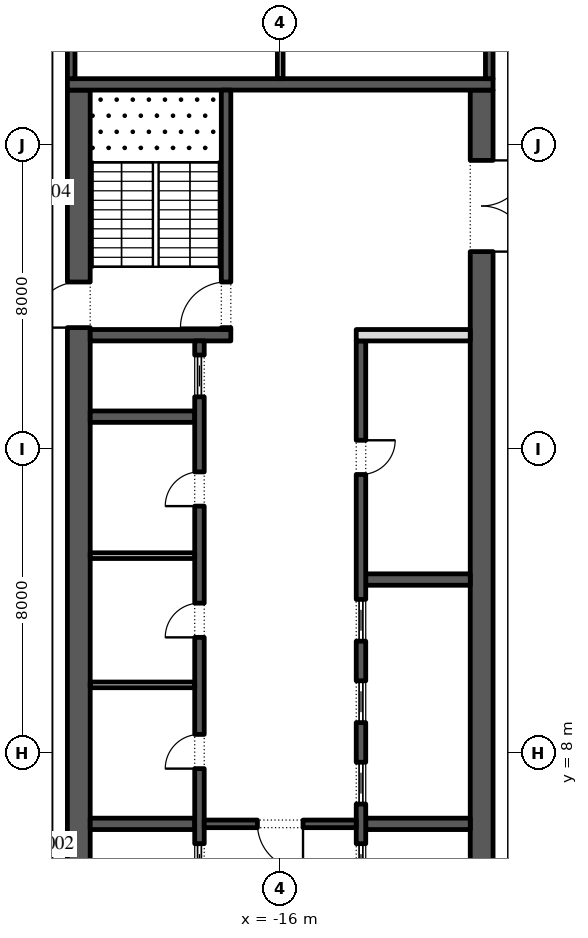
"""IFC4 building model, lengths in metres.
Left out: names, types, materials, properties, quantities, classifications, styles, units other than length and angle.
Written with IfcOpenShell. Run it as: python <this file> out.ifc"""

import sys

from ifc_helpers import new_model, si_unit, direction, frame, frame_2d, origin, place, context, subcontext, project, spatial, rectangle, extrude, element, fill, save


model = new_model("IFC4")
c1 = context("Model", 3, precision=1e-05, world=origin(), true_north=direction((0.0, 1.0)))
c2 = subcontext(c1, "Body", "Model", "MODEL_VIEW")
j1 = project(units=[si_unit("LENGTHUNIT", "METRE"), si_unit("PLANEANGLEUNIT", "RADIAN")], contexts=[c1])
p1 = place(None, origin())
s1 = spatial("IfcSite", under=j1, at=p1, CompositionType="ELEMENT")
p2 = place(p1, origin())
s2 = spatial("IfcBuilding", under=s1, at=p2, CompositionType="ELEMENT")
p3 = place(p2, frame((0.0, 0.0, 251.4)))
s3 = spatial("IfcBuildingStorey", under=s2, at=p3, CompositionType="ELEMENT", Elevation=251.4)
p4 = place(p3, frame((-21.359, 48.678, 0.0), z_axis=(0.0, 0.0, 1.0), x_axis=(-0.224949198343, -0.974370493275, 0.0)))
e1 = element("IfcWall", 1, at=p4, inside=s3, PredefinedType="STANDARD", context=c2, shape_type="SweptSolid", body=[
    extrude(rectangle(XDim=49.5, YDim=0.3, at=frame_2d((24.75, 0.0))), origin(), (0.0, 0.0, 1.0), 4.0),
])
p5 = place(p4, frame((1.157, 0.0, 0.45)))
e2 = element("IfcOpeningElement", 2, at=p5, cuts=e1, PredefinedType="OPENING", context=c2, shape_type="SweptSolid", body=[
    extrude(rectangle(XDim=4.5, YDim=3.05, at=frame_2d((2.25, 1.525))), frame((0.0, 0.16, 0.0), z_axis=(0.0, -1.0, 0.0), x_axis=(1.0, 0.0, 0.0)), (0.0, 0.0, 1.0), 0.32),
])
p6 = place(p4, frame((9.171, 0.0, 0.0)))
e3 = element("IfcOpeningElement", 3, at=p6, cuts=e1, PredefinedType="OPENING", context=c2, shape_type="SweptSolid", body=[
    extrude(rectangle(XDim=2.4, YDim=3.5, at=frame_2d((1.2, 1.75))), frame((0.0, 0.16, 0.0), z_axis=(0.0, -1.0, 0.0), x_axis=(1.0, 0.0, 0.0)), (0.0, 0.0, 1.0), 0.32),
])
p7 = place(p4, frame((15.236, 0.0, 0.45)))
e4 = element("IfcOpeningElement", 4, at=p7, cuts=e1, PredefinedType="OPENING", context=c2, shape_type="SweptSolid", body=[
    extrude(rectangle(XDim=4.5, YDim=3.05, at=frame_2d((2.25, 1.525))), frame((0.0, 0.16, 0.0), z_axis=(0.0, -1.0, 0.0), x_axis=(1.0, 0.0, 0.0)), (0.0, 0.0, 1.0), 0.32),
])
p8 = place(p4, frame((22.35, 0.0, 0.45)))
e5 = element("IfcOpeningElement", 5, at=p8, cuts=e1, PredefinedType="OPENING", context=c2, shape_type="SweptSolid", body=[
    extrude(rectangle(XDim=4.5, YDim=3.05, at=frame_2d((2.25, 1.525))), frame((0.0, 0.16, 0.0), z_axis=(0.0, -1.0, 0.0), x_axis=(1.0, 0.0, 0.0)), (0.0, 0.0, 1.0), 0.32),
])
p9 = place(p4, frame((29.464, 0.0, 0.45)))
e6 = element("IfcOpeningElement", 6, at=p9, cuts=e1, PredefinedType="OPENING", context=c2, shape_type="SweptSolid", body=[
    extrude(rectangle(XDim=4.5, YDim=3.05, at=frame_2d((2.25, 1.525))), frame((0.0, 0.16, 0.0), z_axis=(0.0, -1.0, 0.0), x_axis=(1.0, 0.0, 0.0)), (0.0, 0.0, 1.0), 0.32),
])
p10 = place(p4, frame((37.628, 0.0, 0.0)))
e7 = element("IfcOpeningElement", 7, at=p10, cuts=e1, PredefinedType="OPENING", context=c2, shape_type="SweptSolid", body=[
    extrude(rectangle(XDim=2.4, YDim=3.325, at=frame_2d((1.2, 1.663))), frame((0.0, 0.16, 0.0), z_axis=(0.0, -1.0, 0.0), x_axis=(1.0, 0.0, 0.0)), (0.0, 0.0, 1.0), 0.32),
])
p11 = place(p4, frame((43.693, 0.0, 0.45)))
e8 = element("IfcOpeningElement", 8, at=p11, cuts=e1, PredefinedType="OPENING", context=c2, shape_type="SweptSolid", body=[
    extrude(rectangle(XDim=4.5, YDim=2.825, at=frame_2d((2.25, 1.413))), frame((0.0, 0.16, 0.0), z_axis=(0.0, -1.0, 0.0), x_axis=(1.0, 0.0, 0.0)), (0.0, 0.0, 1.0), 0.32),
])
p12 = place(p3, frame((-21.3, -2.45, 0.0), z_axis=(0.0, 0.0, 1.0), x_axis=(0.0, 1.0, 0.0)))
e9 = element("IfcWall", 9, at=p12, inside=s3, PredefinedType="SHEAR", context=c2, shape_type="SweptSolid", body=[
    extrude(rectangle(XDim=27.9, YDim=0.6, at=frame_2d((13.95, 0.0))), origin(), (0.0, 0.0, 1.0), 4.0),
])
p13 = place(p12, frame((5.05, 0.0, 0.0)))
e10 = element("IfcOpeningElement", 10, at=p13, cuts=e9, PredefinedType="OPENING", context=c2, shape_type="SweptSolid", body=[
    extrude(rectangle(XDim=1.2, YDim=2.1, at=frame_2d((0.6, 1.05))), frame((0.0, 0.31, 0.0), z_axis=(0.0, -1.0, 0.0), x_axis=(1.0, 0.0, 0.0)), (0.0, 0.0, 1.0), 0.62),
])
p14 = place(p12, frame((21.65, 0.0, 0.0)))
e11 = element("IfcOpeningElement", 11, at=p14, cuts=e9, PredefinedType="OPENING", context=c2, shape_type="SweptSolid", body=[
    extrude(rectangle(XDim=1.2, YDim=2.1, at=frame_2d((0.6, 1.05))), frame((0.0, 0.31, 0.0), z_axis=(0.0, -1.0, 0.0), x_axis=(1.0, 0.0, 0.0)), (0.0, 0.0, 1.0), 0.62),
])
p15 = place(p3, frame((-10.7, -2.45, 0.0), z_axis=(0.0, 0.0, 1.0), x_axis=(0.0, 1.0, 0.0)))
e12 = element("IfcWall", 12, at=p15, inside=s3, PredefinedType="SHEAR", context=c2, shape_type="SweptSolid", body=[
    extrude(rectangle(XDim=27.9, YDim=0.6, at=frame_2d((13.95, 0.0))), origin(), (0.0, 0.0, 1.0), 4.0),
])
p16 = place(p15, frame((23.65, 0.0, 0.0)))
e13 = element("IfcOpeningElement", 13, at=p16, cuts=e12, PredefinedType="OPENING", context=c2, shape_type="SweptSolid", body=[
    extrude(rectangle(XDim=2.4, YDim=2.1, at=frame_2d((1.2, 1.05))), frame((0.0, 0.31, 0.0), z_axis=(0.0, -1.0, 0.0), x_axis=(1.0, 0.0, 0.0)), (0.0, 0.0, 1.0), 0.62),
])
p17 = place(p15, frame((1.387, 0.0, 0.0)))
e14 = element("IfcOpeningElement", 14, at=p17, cuts=e12, PredefinedType="OPENING", context=c2, shape_type="SweptSolid", body=[
    extrude(rectangle(XDim=0.9, YDim=2.1, at=frame_2d((0.45, 1.05))), frame((0.0, 0.31, 0.0), z_axis=(0.0, -1.0, 0.0), x_axis=(1.0, 0.0, 0.0)), (0.0, 0.0, 1.0), 0.62),
])
p18 = place(p15, frame((4.562, 0.0, 0.0)))
e15 = element("IfcOpeningElement", 15, at=p18, cuts=e12, PredefinedType="OPENING", context=c2, shape_type="SweptSolid", body=[
    extrude(rectangle(XDim=1.0, YDim=2.1, at=frame_2d((0.5, 1.05))), frame((0.0, 0.31, 0.0), z_axis=(0.0, -1.0, 0.0), x_axis=(1.0, 0.0, 0.0)), (0.0, 0.0, 1.0), 0.62),
])
p19 = place(p3, frame((-21.6, 25.6, 0.0), z_axis=(0.0, 0.0, 1.0), x_axis=(1.0, 0.0, 0.0)))
e16 = element("IfcWall", 16, at=p19, inside=s3, PredefinedType="SHEAR", context=c2, shape_type="SweptSolid", body=[
    extrude(rectangle(XDim=11.2, YDim=0.3, at=frame_2d((5.6, 0.0))), origin(), (0.0, 0.0, 1.0), 4.0),
])
p20 = place(p3, frame((-21.0, 19.0, 0.0), z_axis=(0.0, 0.0, 1.0), x_axis=(1.0, 0.0, 0.0)))
e17 = element("IfcWall", 17, at=p20, inside=s3, PredefinedType="SHEAR", context=c2, shape_type="SweptSolid", body=[
    extrude(rectangle(XDim=3.7, YDim=0.3, at=frame_2d((1.85, 0.0))), origin(), (0.0, 0.0, 1.0), 4.0),
])
p21 = place(p3, frame((-17.425, 19.15, 0.0), z_axis=(0.0, 0.0, 1.0), x_axis=(0.0, 1.0, 0.0)))
e18 = element("IfcWall", 18, at=p21, inside=s3, PredefinedType="SHEAR", context=c2, shape_type="SweptSolid", body=[
    extrude(rectangle(XDim=6.3, YDim=0.25, at=frame_2d((3.15, 0.0))), origin(), (0.0, 0.0, 1.0), 4.0),
])
p22 = place(p21, frame((0.05, 0.0, 0.0)))
e19 = element("IfcOpeningElement", 19, at=p22, cuts=e18, PredefinedType="OPENING", context=c2, shape_type="SweptSolid", body=[
    extrude(rectangle(XDim=1.2, YDim=2.1, at=frame_2d((0.6, 1.05))), frame((0.0, 0.135, 0.0), z_axis=(0.0, -1.0, 0.0), x_axis=(1.0, 0.0, 0.0)), (0.0, 0.0, 1.0), 0.27),
])
for number, where, z_axis, x_axis in (
    (20, (-21.0, 6.143, 0.0), (0.0, 0.0, 1.0), (1.0, 0.0, 0.0)),
    (21, (-21.0, 16.857, 0.0), (0.0, 0.0, 1.0), (1.0, 0.0, 0.0)),
):
    element("IfcWall", number, at=place(p3, frame(where, z_axis=z_axis, x_axis=x_axis)), inside=s3, PredefinedType="SHEAR", context=c2, shape_type="SweptSolid", body=[
        extrude(rectangle(XDim=2.75, YDim=0.3, at=frame_2d((1.375, 0.0))), origin(), (0.0, 0.0, 1.0), 4.0),
    ])
p23 = place(p3, frame((-18.125, 4.15, 0.0), z_axis=(0.0, 0.0, 1.0), x_axis=(0.0, 1.0, 0.0)))
e22 = element("IfcWall", 22, at=p23, inside=s3, PredefinedType="SHEAR", context=c2, shape_type="SweptSolid", body=[
    extrude(rectangle(XDim=14.7, YDim=0.25, at=frame_2d((7.35, 0.0))), origin(), (0.0, 0.0, 1.0), 4.0),
])
p24 = place(p23, frame((3.446, 0.0, 0.0)))
e23 = element("IfcOpeningElement", 23, at=p24, cuts=e22, PredefinedType="OPENING", context=c2, shape_type="SweptSolid", body=[
    extrude(rectangle(XDim=0.9, YDim=2.1, at=frame_2d((0.45, 1.05))), frame((0.0, 0.135, 0.0), z_axis=(0.0, -1.0, 0.0), x_axis=(1.0, 0.0, 0.0)), (0.0, 0.0, 1.0), 0.27),
])
p25 = place(p23, frame((6.9, 0.0, 0.0)))
e24 = element("IfcOpeningElement", 24, at=p25, cuts=e22, PredefinedType="OPENING", context=c2, shape_type="SweptSolid", body=[
    extrude(rectangle(XDim=0.9, YDim=2.1, at=frame_2d((0.45, 1.05))), frame((0.0, 0.135, 0.0), z_axis=(0.0, -1.0, 0.0), x_axis=(1.0, 0.0, 0.0)), (0.0, 0.0, 1.0), 0.27),
])
p26 = place(p23, frame((10.354, 0.0, 0.0)))
e25 = element("IfcOpeningElement", 25, at=p26, cuts=e22, PredefinedType="OPENING", context=c2, shape_type="SweptSolid", body=[
    extrude(rectangle(XDim=0.9, YDim=2.1, at=frame_2d((0.45, 1.05))), frame((0.0, 0.135, 0.0), z_axis=(0.0, -1.0, 0.0), x_axis=(1.0, 0.0, 0.0)), (0.0, 0.0, 1.0), 0.27),
])
p27 = place(p23, frame((0.371, 0.0, 0.0)))
e26 = element("IfcOpeningElement", 26, at=p27, cuts=e22, PredefinedType="OPENING", context=c2, shape_type="SweptSolid", body=[
    extrude(rectangle(XDim=1.1, YDim=2.1, at=frame_2d((0.55, 1.05))), frame((0.0, 0.135, 0.0), z_axis=(0.0, -1.0, 0.0), x_axis=(1.0, 0.0, 0.0)), (0.0, 0.0, 1.0), 0.27),
])
p28 = place(p23, frame((13.229, 0.0, 0.0)))
e27 = element("IfcOpeningElement", 27, at=p28, cuts=e22, PredefinedType="OPENING", context=c2, shape_type="SweptSolid", body=[
    extrude(rectangle(XDim=1.1, YDim=2.1, at=frame_2d((0.55, 1.05))), frame((0.0, 0.135, 0.0), z_axis=(0.0, -1.0, 0.0), x_axis=(1.0, 0.0, 0.0)), (0.0, 0.0, 1.0), 0.27),
])
for number, where, z_axis, x_axis in (
    (28, (-21.0, 9.8, 0.0), (0.0, 0.0, 1.0), (1.0, 0.0, 0.0)),
    (29, (-21.0, 13.2, 0.0), (0.0, 0.0, 1.0), (1.0, 0.0, 0.0)),
):
    element("IfcWall", number, at=place(p3, frame(where, z_axis=z_axis, x_axis=x_axis)), inside=s3, PredefinedType="PARTITIONING", context=c2, shape_type="SweptSolid", body=[
        extrude(rectangle(XDim=2.75, YDim=0.15, at=frame_2d((1.375, 0.0))), origin(), (0.0, 0.0, 1.0), 4.0),
    ])
for number, where, z_axis, x_axis in (
    (30, (-13.75, 6.143, 0.0), (0.0, 0.0, 1.0), (1.0, 0.0, 0.0)),
    (31, (-13.75, 12.571, 0.0), (0.0, 0.0, 1.0), (1.0, 0.0, 0.0)),
):
    element("IfcWall", number, at=place(p3, frame(where, z_axis=z_axis, x_axis=x_axis)), inside=s3, PredefinedType="SHEAR", context=c2, shape_type="SweptSolid", body=[
        extrude(rectangle(XDim=2.75, YDim=0.3, at=frame_2d((1.375, 0.0))), origin(), (0.0, 0.0, 1.0), 4.0),
    ])
p29 = place(p3, frame((-13.875, -2.45, 0.0), z_axis=(0.0, 0.0, 1.0), x_axis=(0.0, 1.0, 0.0)))
e32 = element("IfcWall", 32, at=p29, inside=s3, PredefinedType="SHEAR", context=c2, shape_type="SweptSolid", body=[
    extrude(rectangle(XDim=21.3, YDim=0.25, at=frame_2d((10.65, 0.0))), origin(), (0.0, 0.0, 1.0), 4.0),
])
p30 = place(p29, frame((17.786, 0.0, 0.0)))
e33 = element("IfcOpeningElement", 33, at=p30, cuts=e32, PredefinedType="OPENING", context=c2, shape_type="SweptSolid", body=[
    extrude(rectangle(XDim=0.9, YDim=2.1, at=frame_2d((0.45, 1.05))), frame((0.0, 0.135, 0.0), z_axis=(0.0, -1.0, 0.0), x_axis=(1.0, 0.0, 0.0)), (0.0, 0.0, 1.0), 0.27),
])
p31 = place(p29, frame((6.971, 0.0, 0.0)))
e34 = element("IfcOpeningElement", 34, at=p31, cuts=e32, PredefinedType="OPENING", context=c2, shape_type="SweptSolid", body=[
    extrude(rectangle(XDim=1.1, YDim=2.1, at=frame_2d((0.55, 1.05))), frame((0.0, 0.135, 0.0), z_axis=(0.0, -1.0, 0.0), x_axis=(1.0, 0.0, 0.0)), (0.0, 0.0, 1.0), 0.27),
])
p32 = place(p29, frame((9.114, 0.0, 0.0)))
e35 = element("IfcOpeningElement", 35, at=p32, cuts=e32, PredefinedType="OPENING", context=c2, shape_type="SweptSolid", body=[
    extrude(rectangle(XDim=1.1, YDim=2.1, at=frame_2d((0.55, 1.05))), frame((0.0, 0.135, 0.0), z_axis=(0.0, -1.0, 0.0), x_axis=(1.0, 0.0, 0.0)), (0.0, 0.0, 1.0), 0.27),
])
p33 = place(p29, frame((11.257, 0.0, 0.0)))
e36 = element("IfcOpeningElement", 36, at=p33, cuts=e32, PredefinedType="OPENING", context=c2, shape_type="SweptSolid", body=[
    extrude(rectangle(XDim=1.1, YDim=2.1, at=frame_2d((0.55, 1.05))), frame((0.0, 0.135, 0.0), z_axis=(0.0, -1.0, 0.0), x_axis=(1.0, 0.0, 0.0)), (0.0, 0.0, 1.0), 0.27),
])
p34 = place(p29, frame((13.4, 0.0, 0.0)))
e37 = element("IfcOpeningElement", 37, at=p34, cuts=e32, PredefinedType="OPENING", context=c2, shape_type="SweptSolid", body=[
    extrude(rectangle(XDim=1.1, YDim=2.1, at=frame_2d((0.55, 1.05))), frame((0.0, 0.135, 0.0), z_axis=(0.0, -1.0, 0.0), x_axis=(1.0, 0.0, 0.0)), (0.0, 0.0, 1.0), 0.27),
])
p35 = place(p3, frame((-14.0, 19.0, 0.0), z_axis=(0.0, 0.0, 1.0), x_axis=(1.0, 0.0, 0.0)))
e38 = element("IfcWall", 38, at=p35, inside=s3, PredefinedType="PARTITIONING", context=c2, shape_type="SweptSolid", body=[
    extrude(rectangle(XDim=3.0, YDim=0.3, at=frame_2d((1.5, 0.0))), origin(), (0.0, 0.0, 1.0), 4.0),
])
p36 = place(p3, frame((-18.0, 6.143, 0.0), z_axis=(0.0, 0.0, 1.0), x_axis=(1.0, 0.0, 0.0)))
e39 = element("IfcWall", 39, at=p36, inside=s3, PredefinedType="SHEAR", context=c2, shape_type="SweptSolid", body=[
    extrude(rectangle(XDim=4.0, YDim=0.2, at=frame_2d((2.0, 0.0))), origin(), (0.0, 0.0, 1.0), 4.0),
])
p37 = place(p36, frame((1.4, 0.0, 0.0)))
e40 = element("IfcOpeningElement", 40, at=p37, cuts=e39, PredefinedType="OPENING", context=c2, shape_type="SweptSolid", body=[
    extrude(rectangle(XDim=1.2, YDim=2.1, at=frame_2d((0.6, 1.05))), frame((0.0, 0.11, 0.0), z_axis=(0.0, -1.0, 0.0), x_axis=(1.0, 0.0, 0.0)), (0.0, 0.0, 1.0), 0.22),
])
p38 = place(p3, frame((-21.5, 25.75, 0.0), z_axis=(0.0, 0.0, 1.0), x_axis=(0.0, 1.0, 0.0)))
e41 = element("IfcWall", 41, at=p38, inside=s3, PredefinedType="SHEAR", context=c2, shape_type="SweptSolid", body=[
    extrude(rectangle(XDim=4.75, YDim=0.2, at=frame_2d((2.375, 0.0))), origin(), (0.0, 0.0, 1.0), 4.0),
])
p39 = place(p38, frame((1.925, 0.0, 0.0)))
e42 = element("IfcOpeningElement", 42, at=p39, cuts=e41, PredefinedType="OPENING", context=c2, shape_type="SweptSolid", body=[
    extrude(rectangle(XDim=0.9, YDim=2.1, at=frame_2d((0.45, 1.05))), frame((0.0, 0.11, 0.0), z_axis=(0.0, -1.0, 0.0), x_axis=(1.0, 0.0, 0.0)), (0.0, 0.0, 1.0), 0.22),
])
p40 = place(p3, frame((-10.5, 25.75, 0.0), z_axis=(0.0, 0.0, 1.0), x_axis=(0.0, 1.0, 0.0)))
e43 = element("IfcWall", 43, at=p40, inside=s3, PredefinedType="SHEAR", context=c2, shape_type="SweptSolid", body=[
    extrude(rectangle(XDim=4.75, YDim=0.2, at=frame_2d((2.375, 0.0))), origin(), (0.0, 0.0, 1.0), 4.0),
])
p41 = place(p40, frame((1.925, 0.0, 0.0)))
e44 = element("IfcOpeningElement", 44, at=p41, cuts=e43, PredefinedType="OPENING", context=c2, shape_type="SweptSolid", body=[
    extrude(rectangle(XDim=0.9, YDim=2.1, at=frame_2d((0.45, 1.05))), frame((0.0, 0.11, 0.0), z_axis=(0.0, -1.0, 0.0), x_axis=(1.0, 0.0, 0.0)), (0.0, 0.0, 1.0), 0.22),
])
p42 = place(p3, frame((-16.0, 25.75, 0.0), z_axis=(0.0, 0.0, 1.0), x_axis=(0.0, 1.0, 0.0)))
e45 = element("IfcWall", 45, at=p42, inside=s3, PredefinedType="PARTITIONING", context=c2, shape_type="SweptSolid", body=[
    extrude(rectangle(XDim=4.75, YDim=0.15, at=frame_2d((2.375, 0.0))), origin(), (0.0, 0.0, 1.0), 4.0),
])
p43 = place(p24, origin())
e46 = element("IfcDoor", 46, at=p43, inside=s3, OperationType="SINGLE_SWING_RIGHT", PredefinedType="DOOR", context=c2, shape_type="SweptSolid", body=[
    extrude(rectangle(XDim=0.9, YDim=2.1, at=frame_2d((0.45, 1.05))), frame((0.0, 0.125, 0.0), z_axis=(0.0, -1.0, 0.0), x_axis=(1.0, 0.0, 0.0)), (0.0, 0.0, 1.0), 0.05),
])
fill(e23, e46)
p44 = place(p25, origin())
e47 = element("IfcDoor", 47, at=p44, inside=s3, OperationType="SINGLE_SWING_RIGHT", PredefinedType="DOOR", context=c2, shape_type="SweptSolid", body=[
    extrude(rectangle(XDim=0.9, YDim=2.1, at=frame_2d((0.45, 1.05))), frame((0.0, 0.125, 0.0), z_axis=(0.0, -1.0, 0.0), x_axis=(1.0, 0.0, 0.0)), (0.0, 0.0, 1.0), 0.05),
])
fill(e24, e47)
p45 = place(p26, origin())
e48 = element("IfcDoor", 48, at=p45, inside=s3, OperationType="SINGLE_SWING_RIGHT", PredefinedType="DOOR", context=c2, shape_type="SweptSolid", body=[
    extrude(rectangle(XDim=0.9, YDim=2.1, at=frame_2d((0.45, 1.05))), frame((0.0, 0.125, 0.0), z_axis=(0.0, -1.0, 0.0), x_axis=(1.0, 0.0, 0.0)), (0.0, 0.0, 1.0), 0.05),
])
fill(e25, e48)
p46 = place(p27, origin())
e49 = element("IfcDoor", 49, at=p46, inside=s3, OperationType="SLIDING_TO_LEFT", PredefinedType="DOOR", context=c2, shape_type="SweptSolid", body=[
    extrude(rectangle(XDim=1.1, YDim=2.1, at=frame_2d((0.55, 1.05))), frame((0.0, 0.025, 0.0), z_axis=(0.0, -1.0, 0.0), x_axis=(1.0, 0.0, 0.0)), (0.0, 0.0, 1.0), 0.05),
])
fill(e26, e49)
p47 = place(p28, origin())
e50 = element("IfcDoor", 50, at=p47, inside=s3, OperationType="SLIDING_TO_LEFT", PredefinedType="DOOR", context=c2, shape_type="SweptSolid", body=[
    extrude(rectangle(XDim=1.1, YDim=2.1, at=frame_2d((0.55, 1.05))), frame((0.0, 0.025, 0.0), z_axis=(0.0, -1.0, 0.0), x_axis=(1.0, 0.0, 0.0)), (0.0, 0.0, 1.0), 0.05),
])
fill(e27, e50)
p48 = place(p30, frame((0.9, -0.2, 0.0), z_axis=(0.0, 0.0, 1.0), x_axis=(-1.0, 0.0, 0.0)))
e51 = element("IfcDoor", 51, at=p48, inside=s3, OperationType="SINGLE_SWING_RIGHT", PredefinedType="DOOR", context=c2, shape_type="SweptSolid", body=[
    extrude(rectangle(XDim=0.9, YDim=2.1, at=frame_2d((0.45, 1.05))), frame((0.0, -0.075, 0.0), z_axis=(0.0, -1.0, 0.0), x_axis=(1.0, 0.0, 0.0)), (0.0, 0.0, 1.0), 0.05),
])
fill(e33, e51)
p49 = place(p31, origin())
e52 = element("IfcDoor", 52, at=p49, inside=s3, OperationType="SLIDING_TO_LEFT", PredefinedType="DOOR", context=c2, shape_type="SweptSolid", body=[
    extrude(rectangle(XDim=1.1, YDim=2.1, at=frame_2d((0.55, 1.05))), frame((0.0, 0.025, 0.0), z_axis=(0.0, -1.0, 0.0), x_axis=(1.0, 0.0, 0.0)), (0.0, 0.0, 1.0), 0.05),
])
fill(e34, e52)
p50 = place(p32, origin())
e53 = element("IfcDoor", 53, at=p50, inside=s3, OperationType="SLIDING_TO_LEFT", PredefinedType="DOOR", context=c2, shape_type="SweptSolid", body=[
    extrude(rectangle(XDim=1.1, YDim=2.1, at=frame_2d((0.55, 1.05))), frame((0.0, 0.025, 0.0), z_axis=(0.0, -1.0, 0.0), x_axis=(1.0, 0.0, 0.0)), (0.0, 0.0, 1.0), 0.05),
])
fill(e35, e53)
p51 = place(p33, origin())
e54 = element("IfcDoor", 54, at=p51, inside=s3, OperationType="SLIDING_TO_LEFT", PredefinedType="DOOR", context=c2, shape_type="SweptSolid", body=[
    extrude(rectangle(XDim=1.1, YDim=2.1, at=frame_2d((0.55, 1.05))), frame((0.0, 0.025, 0.0), z_axis=(0.0, -1.0, 0.0), x_axis=(1.0, 0.0, 0.0)), (0.0, 0.0, 1.0), 0.05),
])
fill(e36, e54)
p52 = place(p34, origin())
e55 = element("IfcDoor", 55, at=p52, inside=s3, OperationType="SLIDING_TO_LEFT", PredefinedType="DOOR", context=c2, shape_type="SweptSolid", body=[
    extrude(rectangle(XDim=1.1, YDim=2.1, at=frame_2d((0.55, 1.05))), frame((0.0, 0.025, 0.0), z_axis=(0.0, -1.0, 0.0), x_axis=(1.0, 0.0, 0.0)), (0.0, 0.0, 1.0), 0.05),
])
fill(e37, e55)
p53 = place(p37, frame((1.2, 0.0, 0.0), z_axis=(0.0, 0.0, 1.0), x_axis=(-1.0, 0.0, 0.0)))
e56 = element("IfcDoor", 56, at=p53, inside=s3, OperationType="SINGLE_SWING_RIGHT", PredefinedType="DOOR", context=c2, shape_type="SweptSolid", body=[
    extrude(rectangle(XDim=1.2, YDim=2.1, at=frame_2d((0.6, 1.05))), frame((0.0, 0.025, 0.0), z_axis=(0.0, -1.0, 0.0), x_axis=(1.0, 0.0, 0.0)), (0.0, 0.0, 1.0), 0.05),
])
fill(e40, e56)
p54 = place(p16, frame((2.4, 0.0, 0.0), z_axis=(0.0, 0.0, 1.0), x_axis=(-1.0, 0.0, 0.0)))
e57 = element("IfcDoor", 57, at=p54, inside=s3, OperationType="DOUBLE_DOOR_SINGLE_SWING", PredefinedType="DOOR", context=c2, shape_type="SweptSolid", body=[
    extrude(rectangle(XDim=2.4, YDim=2.1, at=frame_2d((1.2, 1.05))), frame((0.0, 0.025, 0.0), z_axis=(0.0, -1.0, 0.0), x_axis=(1.0, 0.0, 0.0)), (0.0, 0.0, 1.0), 0.05),
])
fill(e13, e57)
p55 = place(p22, origin())
e58 = element("IfcDoor", 58, at=p55, inside=s3, OperationType="SINGLE_SWING_RIGHT", PredefinedType="DOOR", context=c2, shape_type="SweptSolid", body=[
    extrude(rectangle(XDim=1.2, YDim=2.1, at=frame_2d((0.6, 1.05))), frame((0.0, 0.025, 0.0), z_axis=(0.0, -1.0, 0.0), x_axis=(1.0, 0.0, 0.0)), (0.0, 0.0, 1.0), 0.05),
])
fill(e19, e58)
p56 = place(p14, origin())
e59 = element("IfcDoor", 59, at=p56, inside=s3, OperationType="SINGLE_SWING_RIGHT", PredefinedType="DOOR", context=c2, shape_type="SweptSolid", body=[
    extrude(rectangle(XDim=1.2, YDim=2.1, at=frame_2d((0.6, 1.05))), frame((0.0, 0.025, 0.0), z_axis=(0.0, -1.0, 0.0), x_axis=(1.0, 0.0, 0.0)), (0.0, 0.0, 1.0), 0.05),
])
fill(e11, e59)
save(model, sys.argv[1])
